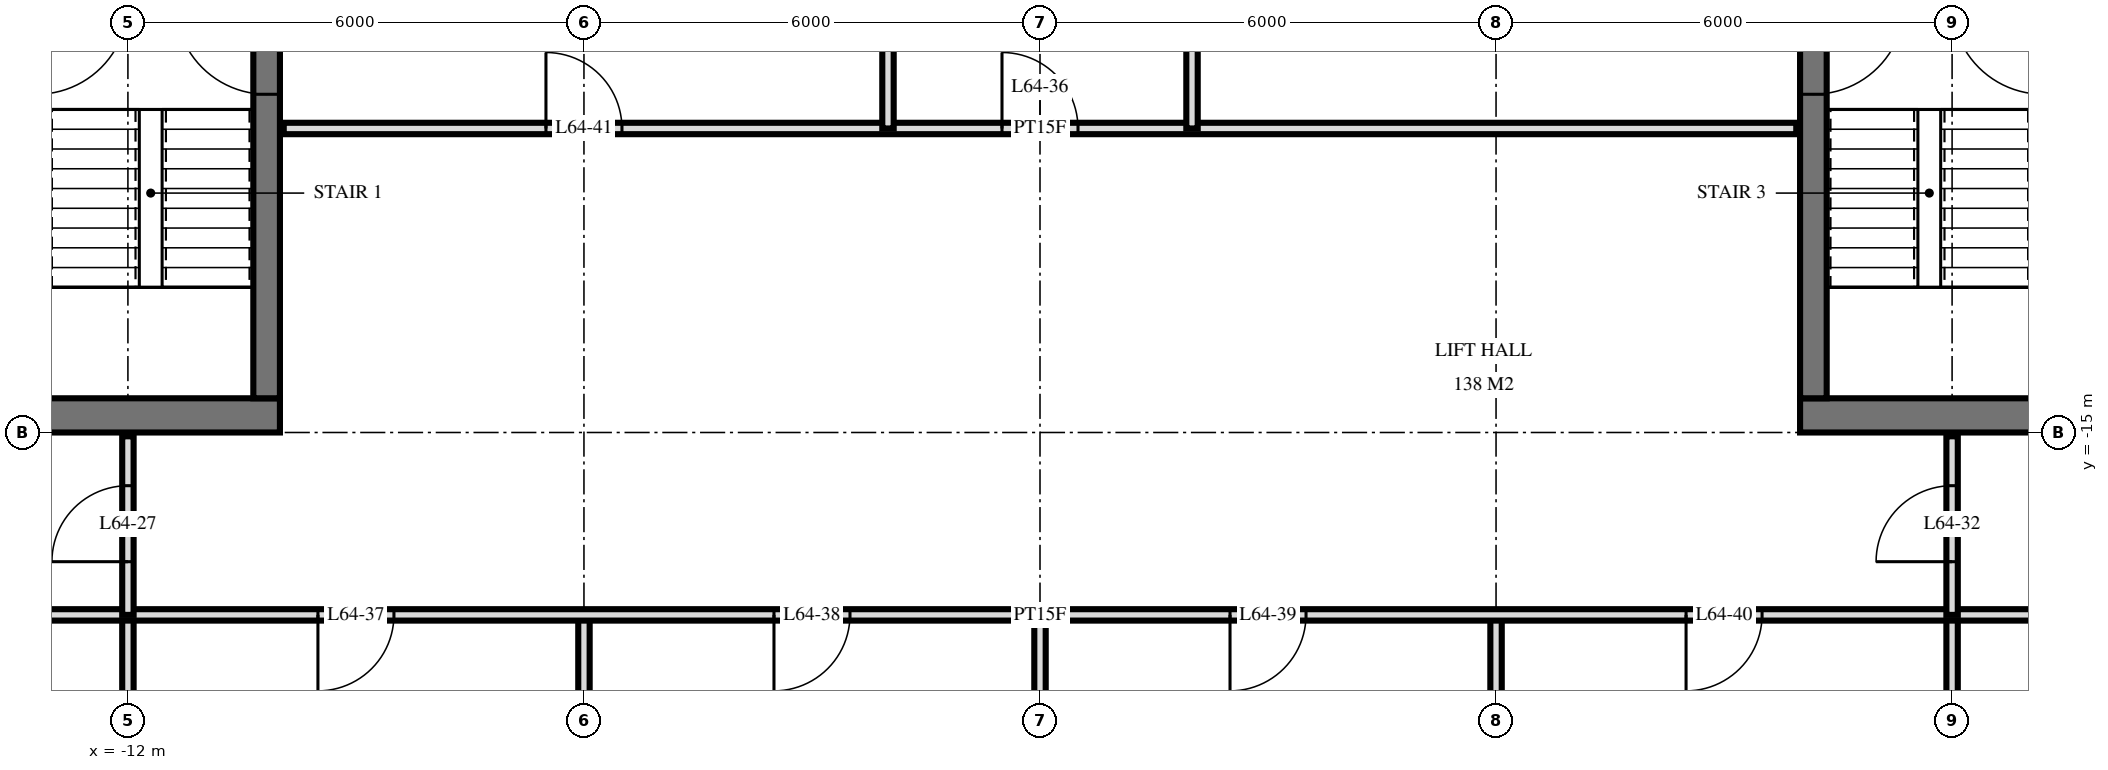
"""IFC4 building model, lengths in metres.
Left out: names, types, materials, properties, quantities, classifications, styles, units other than length and angle.
Written with IfcOpenShell. Run it as: python <this file> out.ifc"""

import sys

from ifc_helpers import new_model, si_unit, direction, frame, frame_2d, origin, place, context, subcontext, project, spatial, rectangle, extrude, element, fill, save


model = new_model("IFC4")
c1 = context("Model", 3, precision=1e-05, world=origin(), true_north=direction((0.0, 1.0)))
c2 = subcontext(c1, "Body", "Model", "MODEL_VIEW")
j1 = project(units=[si_unit("LENGTHUNIT", "METRE"), si_unit("PLANEANGLEUNIT", "RADIAN")], contexts=[c1])
p1 = place(None, origin())
s1 = spatial("IfcSite", under=j1, at=p1, CompositionType="ELEMENT")
p2 = place(p1, origin())
s2 = spatial("IfcBuilding", under=s1, at=p2, CompositionType="ELEMENT")
p3 = place(p2, frame((0.0, 0.0, 243.1)))
s3 = spatial("IfcBuildingStorey", under=s2, at=p3, CompositionType="ELEMENT", Elevation=243.1)
p4 = place(p3, frame((-24.5, -14.775, 0.0), z_axis=(0.0, 0.0, 1.0), x_axis=(1.0, 0.0, 0.0)))
e1 = element("IfcWall", 1, at=p4, inside=s3, PredefinedType="SHEAR", context=c2, shape_type="SweptSolid", body=[
    extrude(rectangle(XDim=14.5, YDim=0.45, at=frame_2d((7.25, 0.0))), origin(), (0.0, 0.0, 1.0), 3.5),
])
p5 = place(p4, frame((6.2, 0.0, 0.0)))
e2 = element("IfcOpeningElement", 2, at=p5, cuts=e1, PredefinedType="OPENING", context=c2, shape_type="SweptSolid", body=[
    extrude(rectangle(XDim=1.2, YDim=2.1, at=frame_2d((0.6, 1.05))), frame((0.0, 0.235, 0.0), z_axis=(0.0, -1.0, 0.0), x_axis=(1.0, 0.0, 0.0)), (0.0, 0.0, 1.0), 0.47),
])
p6 = place(p4, frame((9.25, 0.0, 0.0)))
e3 = element("IfcOpeningElement", 3, at=p6, cuts=e1, PredefinedType="OPENING", context=c2, shape_type="SweptSolid", body=[
    extrude(rectangle(XDim=1.1, YDim=2.1, at=frame_2d((0.55, 1.05))), frame((0.0, 0.235, 0.0), z_axis=(0.0, -1.0, 0.0), x_axis=(1.0, 0.0, 0.0)), (0.0, 0.0, 1.0), 0.47),
])
p7 = place(p4, frame((3.5, 0.0, 0.0)))
e4 = element("IfcOpeningElement", 4, at=p7, cuts=e1, PredefinedType="OPENING", context=c2, shape_type="SweptSolid", body=[
    extrude(rectangle(XDim=0.9, YDim=2.1, at=frame_2d((0.45, 1.05))), frame((0.0, 0.235, 0.0), z_axis=(0.0, -1.0, 0.0), x_axis=(1.0, 0.0, 0.0)), (0.0, 0.0, 1.0), 0.47),
])
p8 = place(p4, frame((1.05, 0.0, 0.0)))
e5 = element("IfcOpeningElement", 5, at=p8, cuts=e1, PredefinedType="OPENING", context=c2, shape_type="SweptSolid", body=[
    extrude(rectangle(XDim=1.0, YDim=2.1, at=frame_2d((0.5, 1.05))), frame((0.0, 0.235, 0.0), z_axis=(0.0, -1.0, 0.0), x_axis=(1.0, 0.0, 0.0)), (0.0, 0.0, 1.0), 0.47),
])
p9 = place(p3, frame((-10.175, -14.55, 0.0), z_axis=(0.0, 0.0, 1.0), x_axis=(0.0, 1.0, 0.0)))
e6 = element("IfcWall", 6, at=p9, inside=s3, PredefinedType="SHEAR", context=c2, shape_type="SweptSolid", body=[
    extrude(rectangle(XDim=14.1, YDim=0.35, at=frame_2d((7.05, 0.0))), origin(), (0.0, 0.0, 1.0), 3.5),
])
p10 = place(p9, frame((8.4, 0.0, 0.0)))
e7 = element("IfcOpeningElement", 7, at=p10, cuts=e6, PredefinedType="OPENING", context=c2, shape_type="SweptSolid", body=[
    extrude(rectangle(XDim=1.4, YDim=2.4, at=frame_2d((0.7, 1.2))), frame((0.0, 0.185, 0.0), z_axis=(0.0, -1.0, 0.0), x_axis=(1.0, 0.0, 0.0)), (0.0, 0.0, 1.0), 0.37),
])
p11 = place(p9, frame((10.0, 0.0, 0.0)))
e8 = element("IfcOpeningElement", 8, at=p11, cuts=e6, PredefinedType="OPENING", context=c2, shape_type="SweptSolid", body=[
    extrude(rectangle(XDim=1.4, YDim=2.4, at=frame_2d((0.7, 1.2))), frame((0.0, 0.185, 0.0), z_axis=(0.0, -1.0, 0.0), x_axis=(1.0, 0.0, 0.0)), (0.0, 0.0, 1.0), 0.37),
])
p12 = place(p9, frame((4.0, 0.0, 0.0)))
e9 = element("IfcOpeningElement", 9, at=p12, cuts=e6, PredefinedType="OPENING", context=c2, shape_type="SweptSolid", body=[
    extrude(rectangle(XDim=1.2, YDim=2.1, at=frame_2d((0.6, 1.05))), frame((0.0, 0.185, 0.0), z_axis=(0.0, -1.0, 0.0), x_axis=(1.0, 0.0, 0.0)), (0.0, 0.0, 1.0), 0.37),
])
p13 = place(p3, frame((10.0, -14.775, 0.0), z_axis=(0.0, 0.0, 1.0), x_axis=(1.0, 0.0, 0.0)))
e10 = element("IfcWall", 10, at=p13, inside=s3, PredefinedType="SHEAR", context=c2, shape_type="SweptSolid", body=[
    extrude(rectangle(XDim=14.5, YDim=0.45, at=frame_2d((7.25, 0.0))), origin(), (0.0, 0.0, 1.0), 3.5),
])
p14 = place(p13, frame((7.1, 0.0, 0.0)))
e11 = element("IfcOpeningElement", 11, at=p14, cuts=e10, PredefinedType="OPENING", context=c2, shape_type="SweptSolid", body=[
    extrude(rectangle(XDim=1.2, YDim=2.1, at=frame_2d((0.6, 1.05))), frame((0.0, 0.235, 0.0), z_axis=(0.0, -1.0, 0.0), x_axis=(1.0, 0.0, 0.0)), (0.0, 0.0, 1.0), 0.47),
])
p15 = place(p13, frame((4.15, 0.0, 0.0)))
e12 = element("IfcOpeningElement", 12, at=p15, cuts=e10, PredefinedType="OPENING", context=c2, shape_type="SweptSolid", body=[
    extrude(rectangle(XDim=1.1, YDim=2.1, at=frame_2d((0.55, 1.05))), frame((0.0, 0.235, 0.0), z_axis=(0.0, -1.0, 0.0), x_axis=(1.0, 0.0, 0.0)), (0.0, 0.0, 1.0), 0.47),
])
p16 = place(p13, frame((10.1, 0.0, 0.0)))
e13 = element("IfcOpeningElement", 13, at=p16, cuts=e10, PredefinedType="OPENING", context=c2, shape_type="SweptSolid", body=[
    extrude(rectangle(XDim=0.9, YDim=2.1, at=frame_2d((0.45, 1.05))), frame((0.0, 0.235, 0.0), z_axis=(0.0, -1.0, 0.0), x_axis=(1.0, 0.0, 0.0)), (0.0, 0.0, 1.0), 0.47),
])
p17 = place(p13, frame((12.45, 0.0, 0.0)))
e14 = element("IfcOpeningElement", 14, at=p17, cuts=e10, PredefinedType="OPENING", context=c2, shape_type="SweptSolid", body=[
    extrude(rectangle(XDim=1.0, YDim=2.1, at=frame_2d((0.5, 1.05))), frame((0.0, 0.235, 0.0), z_axis=(0.0, -1.0, 0.0), x_axis=(1.0, 0.0, 0.0)), (0.0, 0.0, 1.0), 0.47),
])
p18 = place(p3, frame((10.175, -14.55, 0.0), z_axis=(0.0, 0.0, 1.0), x_axis=(0.0, 1.0, 0.0)))
e15 = element("IfcWall", 15, at=p18, inside=s3, PredefinedType="SHEAR", context=c2, shape_type="SweptSolid", body=[
    extrude(rectangle(XDim=14.1, YDim=0.35, at=frame_2d((7.05, 0.0))), origin(), (0.0, 0.0, 1.0), 3.5),
])
p19 = place(p18, frame((8.4, 0.0, 0.0)))
e16 = element("IfcOpeningElement", 16, at=p19, cuts=e15, PredefinedType="OPENING", context=c2, shape_type="SweptSolid", body=[
    extrude(rectangle(XDim=1.4, YDim=2.4, at=frame_2d((0.7, 1.2))), frame((0.0, 0.185, 0.0), z_axis=(0.0, -1.0, 0.0), x_axis=(1.0, 0.0, 0.0)), (0.0, 0.0, 1.0), 0.37),
])
p20 = place(p18, frame((10.0, 0.0, 0.0)))
e17 = element("IfcOpeningElement", 17, at=p20, cuts=e15, PredefinedType="OPENING", context=c2, shape_type="SweptSolid", body=[
    extrude(rectangle(XDim=1.4, YDim=2.4, at=frame_2d((0.7, 1.2))), frame((0.0, 0.185, 0.0), z_axis=(0.0, -1.0, 0.0), x_axis=(1.0, 0.0, 0.0)), (0.0, 0.0, 1.0), 0.37),
])
p21 = place(p18, frame((4.0, 0.0, 0.0)))
e18 = element("IfcOpeningElement", 18, at=p21, cuts=e15, PredefinedType="OPENING", context=c2, shape_type="SweptSolid", body=[
    extrude(rectangle(XDim=1.2, YDim=2.1, at=frame_2d((0.6, 1.05))), frame((0.0, 0.185, 0.0), z_axis=(0.0, -1.0, 0.0), x_axis=(1.0, 0.0, 0.0)), (0.0, 0.0, 1.0), 0.37),
])
p22 = place(p3, frame((12.0, -17.4, 0.0), z_axis=(0.0, 0.0, 1.0), x_axis=(0.0, 1.0, 0.0)))
e19 = element("IfcWall", 19, at=p22, inside=s3, PredefinedType="PARTITIONING", context=c2, shape_type="SweptSolid", body=[
    extrude(rectangle(XDim=2.35, YDim=0.15, at=frame_2d((1.175, 0.0))), origin(), (0.0, 0.0, 1.0), 3.22),
])
p23 = place(p22, frame((0.7, 0.0, 0.0)))
e20 = element("IfcOpeningElement", 20, at=p23, cuts=e19, PredefinedType="OPENING", context=c2, shape_type="SweptSolid", body=[
    extrude(rectangle(XDim=1.0, YDim=2.1, at=frame_2d((0.5, 1.05))), frame((0.0, 0.085, 0.0), z_axis=(0.0, -1.0, 0.0), x_axis=(1.0, 0.0, 0.0)), (0.0, 0.0, 1.0), 0.17),
])
for number, where, z_axis, x_axis in (
    (21, (12.0, -29.22, 0.0), (0.0, 0.0, 1.0), (0.0, 1.0, 0.0)),
    (22, (6.0, -29.22, 0.0), (0.0, 0.0, 1.0), (0.0, 1.0, 0.0)),
):
    element("IfcWall", number, at=place(p3, frame(where, z_axis=z_axis, x_axis=x_axis)), inside=s3, PredefinedType="PARTITIONING", context=c2, shape_type="SweptSolid", body=[
        extrude(rectangle(XDim=11.82, YDim=0.15, at=frame_2d((5.91, 0.0))), origin(), (0.0, 0.0, 1.0), 3.22),
    ])
p24 = place(p3, frame((2.0, -11.0, 0.0), z_axis=(0.0, 0.0, 1.0), x_axis=(0.0, 1.0, 0.0)))
e23 = element("IfcWall", 23, at=p24, inside=s3, PredefinedType="PARTITIONING", context=c2, shape_type="SweptSolid", body=[
    extrude(rectangle(XDim=4.0, YDim=0.15, at=frame_2d((2.0, 0.0))), origin(), (0.0, 0.0, 1.0), 3.22),
])
p25 = place(p3, frame((0.0, -29.22, 0.0), z_axis=(0.0, 0.0, 1.0), x_axis=(0.0, 1.0, 0.0)))
e24 = element("IfcWall", 24, at=p25, inside=s3, PredefinedType="PARTITIONING", context=c2, shape_type="SweptSolid", body=[
    extrude(rectangle(XDim=11.82, YDim=0.15, at=frame_2d((5.91, 0.0))), origin(), (0.0, 0.0, 1.0), 3.22),
])
p26 = place(p3, frame((-2.0, -11.0, 0.0), z_axis=(0.0, 0.0, 1.0), x_axis=(0.0, 1.0, 0.0)))
e25 = element("IfcWall", 25, at=p26, inside=s3, PredefinedType="PARTITIONING", context=c2, shape_type="SweptSolid", body=[
    extrude(rectangle(XDim=4.0, YDim=0.15, at=frame_2d((2.0, 0.0))), origin(), (0.0, 0.0, 1.0), 3.22),
])
p27 = place(p3, frame((-6.0, -29.22, 0.0), z_axis=(0.0, 0.0, 1.0), x_axis=(0.0, 1.0, 0.0)))
e26 = element("IfcWall", 26, at=p27, inside=s3, PredefinedType="PARTITIONING", context=c2, shape_type="SweptSolid", body=[
    extrude(rectangle(XDim=11.82, YDim=0.15, at=frame_2d((5.91, 0.0))), origin(), (0.0, 0.0, 1.0), 3.22),
])
p28 = place(p3, frame((-12.0, -17.4, 0.0), z_axis=(0.0, 0.0, 1.0), x_axis=(0.0, 1.0, 0.0)))
e27 = element("IfcWall", 27, at=p28, inside=s3, PredefinedType="PARTITIONING", context=c2, shape_type="SweptSolid", body=[
    extrude(rectangle(XDim=2.35, YDim=0.15, at=frame_2d((1.175, 0.0))), origin(), (0.0, 0.0, 1.0), 3.22),
])
p29 = place(p28, frame((0.7, 0.0, 0.0)))
e28 = element("IfcOpeningElement", 28, at=p29, cuts=e27, PredefinedType="OPENING", context=c2, shape_type="SweptSolid", body=[
    extrude(rectangle(XDim=1.0, YDim=2.1, at=frame_2d((0.5, 1.05))), frame((0.0, 0.085, 0.0), z_axis=(0.0, -1.0, 0.0), x_axis=(1.0, 0.0, 0.0)), (0.0, 0.0, 1.0), 0.17),
])
p30 = place(p3, frame((-12.0, -29.22, 0.0), z_axis=(0.0, 0.0, 1.0), x_axis=(0.0, 1.0, 0.0)))
e29 = element("IfcWall", 29, at=p30, inside=s3, PredefinedType="PARTITIONING", context=c2, shape_type="SweptSolid", body=[
    extrude(rectangle(XDim=11.82, YDim=0.15, at=frame_2d((5.91, 0.0))), origin(), (0.0, 0.0, 1.0), 3.22),
])
p31 = place(p3, frame((-26.82, -17.4, 0.0), z_axis=(0.0, 0.0, 1.0), x_axis=(1.0, 0.0, 0.0)))
e30 = element("IfcWall", 30, at=p31, inside=s3, PredefinedType="PARTITIONING", context=c2, shape_type="SweptSolid", body=[
    extrude(rectangle(XDim=53.64, YDim=0.15, at=frame_2d((26.82, 0.0))), origin(), (0.0, 0.0, 1.0), 3.22),
])
p32 = place(p31, frame((11.97, 0.0, 0.0)))
e31 = element("IfcOpeningElement", 31, at=p32, cuts=e30, PredefinedType="OPENING", context=c2, shape_type="SweptSolid", body=[
    extrude(rectangle(XDim=1.0, YDim=2.1, at=frame_2d((0.5, 1.05))), frame((0.0, 0.085, 0.0), z_axis=(0.0, -1.0, 0.0), x_axis=(1.0, 0.0, 0.0)), (0.0, 0.0, 1.0), 0.17),
])
p33 = place(p31, frame((3.92, 0.0, 0.0)))
e32 = element("IfcOpeningElement", 32, at=p33, cuts=e30, PredefinedType="OPENING", context=c2, shape_type="SweptSolid", body=[
    extrude(rectangle(XDim=1.0, YDim=2.1, at=frame_2d((0.5, 1.05))), frame((0.0, 0.085, 0.0), z_axis=(0.0, -1.0, 0.0), x_axis=(1.0, 0.0, 0.0)), (0.0, 0.0, 1.0), 0.17),
])
p34 = place(p31, frame((5.72, 0.0, 0.0)))
e33 = element("IfcOpeningElement", 33, at=p34, cuts=e30, PredefinedType="OPENING", context=c2, shape_type="SweptSolid", body=[
    extrude(rectangle(XDim=1.0, YDim=2.1, at=frame_2d((0.5, 1.05))), frame((0.0, 0.085, 0.0), z_axis=(0.0, -1.0, 0.0), x_axis=(1.0, 0.0, 0.0)), (0.0, 0.0, 1.0), 0.17),
])
p35 = place(p31, frame((47.72, 0.0, 0.0)))
e34 = element("IfcOpeningElement", 34, at=p35, cuts=e30, PredefinedType="OPENING", context=c2, shape_type="SweptSolid", body=[
    extrude(rectangle(XDim=1.0, YDim=2.1, at=frame_2d((0.5, 1.05))), frame((0.0, 0.085, 0.0), z_axis=(0.0, -1.0, 0.0), x_axis=(1.0, 0.0, 0.0)), (0.0, 0.0, 1.0), 0.17),
])
p36 = place(p31, frame((51.02, 0.0, 0.0)))
e35 = element("IfcOpeningElement", 35, at=p36, cuts=e30, PredefinedType="OPENING", context=c2, shape_type="SweptSolid", body=[
    extrude(rectangle(XDim=1.0, YDim=2.1, at=frame_2d((0.5, 1.05))), frame((0.0, 0.085, 0.0), z_axis=(0.0, -1.0, 0.0), x_axis=(1.0, 0.0, 0.0)), (0.0, 0.0, 1.0), 0.17),
])
p37 = place(p31, frame((17.32, 0.0, 0.0)))
e36 = element("IfcOpeningElement", 36, at=p37, cuts=e30, PredefinedType="OPENING", context=c2, shape_type="SweptSolid", body=[
    extrude(rectangle(XDim=1.0, YDim=2.1, at=frame_2d((0.5, 1.05))), frame((0.0, 0.085, 0.0), z_axis=(0.0, -1.0, 0.0), x_axis=(1.0, 0.0, 0.0)), (0.0, 0.0, 1.0), 0.17),
])
p38 = place(p31, frame((23.32, 0.0, 0.0)))
e37 = element("IfcOpeningElement", 37, at=p38, cuts=e30, PredefinedType="OPENING", context=c2, shape_type="SweptSolid", body=[
    extrude(rectangle(XDim=1.0, YDim=2.1, at=frame_2d((0.5, 1.05))), frame((0.0, 0.085, 0.0), z_axis=(0.0, -1.0, 0.0), x_axis=(1.0, 0.0, 0.0)), (0.0, 0.0, 1.0), 0.17),
])
p39 = place(p31, frame((29.32, 0.0, 0.0)))
e38 = element("IfcOpeningElement", 38, at=p39, cuts=e30, PredefinedType="OPENING", context=c2, shape_type="SweptSolid", body=[
    extrude(rectangle(XDim=1.0, YDim=2.1, at=frame_2d((0.5, 1.05))), frame((0.0, 0.085, 0.0), z_axis=(0.0, -1.0, 0.0), x_axis=(1.0, 0.0, 0.0)), (0.0, 0.0, 1.0), 0.17),
])
p40 = place(p31, frame((35.32, 0.0, 0.0)))
e39 = element("IfcOpeningElement", 39, at=p40, cuts=e30, PredefinedType="OPENING", context=c2, shape_type="SweptSolid", body=[
    extrude(rectangle(XDim=1.0, YDim=2.1, at=frame_2d((0.5, 1.05))), frame((0.0, 0.085, 0.0), z_axis=(0.0, -1.0, 0.0), x_axis=(1.0, 0.0, 0.0)), (0.0, 0.0, 1.0), 0.17),
])
p41 = place(p3, frame((-9.95, -11.0, 0.0), z_axis=(0.0, 0.0, 1.0), x_axis=(1.0, 0.0, 0.0)))
e40 = element("IfcWall", 40, at=p41, inside=s3, PredefinedType="PARTITIONING", context=c2, shape_type="SweptSolid", body=[
    extrude(rectangle(XDim=19.9, YDim=0.15, at=frame_2d((9.95, 0.0))), origin(), (0.0, 0.0, 1.0), 3.22),
])
p42 = place(p41, frame((9.45, 0.0, 0.0)))
e41 = element("IfcOpeningElement", 41, at=p42, cuts=e40, PredefinedType="OPENING", context=c2, shape_type="SweptSolid", body=[
    extrude(rectangle(XDim=1.0, YDim=2.1, at=frame_2d((0.5, 1.05))), frame((0.0, 0.085, 0.0), z_axis=(0.0, -1.0, 0.0), x_axis=(1.0, 0.0, 0.0)), (0.0, 0.0, 1.0), 0.17),
])
p43 = place(p41, frame((3.45, 0.0, 0.0)))
e42 = element("IfcOpeningElement", 42, at=p43, cuts=e40, PredefinedType="OPENING", context=c2, shape_type="SweptSolid", body=[
    extrude(rectangle(XDim=1.0, YDim=2.1, at=frame_2d((0.5, 1.05))), frame((0.0, 0.085, 0.0), z_axis=(0.0, -1.0, 0.0), x_axis=(1.0, 0.0, 0.0)), (0.0, 0.0, 1.0), 0.17),
])
p44 = place(p12, origin())
e43 = element("IfcDoor", 43, at=p44, inside=s3, OperationType="SINGLE_SWING_LEFT", PredefinedType="DOOR", context=c2, shape_type="SweptSolid", body=[
    extrude(rectangle(XDim=1.2, YDim=2.1, at=frame_2d((0.6, 1.05))), frame((0.0, 0.025, 0.0), z_axis=(0.0, -1.0, 0.0), x_axis=(1.0, 0.0, 0.0)), (0.0, 0.0, 1.0), 0.05),
])
fill(e9, e43)
p45 = place(p21, frame((0.6, 0.0, 0.0), z_axis=(0.0, 0.0, 1.0), x_axis=(-1.0, 0.0, 0.0)))
e44 = element("IfcDoor", 44, at=p45, inside=s3, OperationType="SINGLE_SWING_RIGHT", PredefinedType="DOOR", context=c2, shape_type="SweptSolid", body=[
    extrude(rectangle(XDim=1.2, YDim=2.1, at=frame_2d((0.0, 1.05))), frame((0.0, -0.025, 0.0), z_axis=(0.0, 1.0, 0.0), x_axis=(-1.0, 0.0, 0.0)), (0.0, 0.0, 1.0), 0.05),
])
fill(e18, e44)
p46 = place(p29, origin())
e45 = element("IfcDoor", 45, at=p46, inside=s3, OperationType="SINGLE_SWING_RIGHT", PredefinedType="DOOR", context=c2, shape_type="SweptSolid", body=[
    extrude(rectangle(XDim=1.0, YDim=2.1, at=frame_2d((0.5, 1.05))), frame((0.0, 0.025, 0.0), z_axis=(0.0, -1.0, 0.0), x_axis=(1.0, 0.0, 0.0)), (0.0, 0.0, 1.0), 0.05),
])
fill(e28, e45)
p47 = place(p23, origin())
e46 = element("IfcDoor", 46, at=p47, inside=s3, OperationType="SINGLE_SWING_RIGHT", PredefinedType="DOOR", context=c2, shape_type="SweptSolid", body=[
    extrude(rectangle(XDim=1.0, YDim=2.1, at=frame_2d((0.5, 1.05))), frame((0.0, 0.025, 0.0), z_axis=(0.0, -1.0, 0.0), x_axis=(1.0, 0.0, 0.0)), (0.0, 0.0, 1.0), 0.05),
])
fill(e20, e46)
p48 = place(p42, origin())
e47 = element("IfcDoor", 47, at=p48, inside=s3, OperationType="SINGLE_SWING_RIGHT", PredefinedType="DOOR", context=c2, shape_type="SweptSolid", body=[
    extrude(rectangle(XDim=1.0, YDim=2.1, at=frame_2d((0.5, 1.05))), frame((0.0, 0.025, 0.0), z_axis=(0.0, -1.0, 0.0), x_axis=(1.0, 0.0, 0.0)), (0.0, 0.0, 1.0), 0.05),
])
fill(e41, e47)
p49 = place(p37, frame((0.5, 0.0, 0.0), z_axis=(0.0, 0.0, 1.0), x_axis=(-1.0, 0.0, 0.0)))
e48 = element("IfcDoor", 48, at=p49, inside=s3, OperationType="SINGLE_SWING_LEFT", PredefinedType="DOOR", context=c2, shape_type="SweptSolid", body=[
    extrude(rectangle(XDim=1.0, YDim=2.1, at=frame_2d((0.0, 1.05))), frame((0.0, -0.025, 0.0), z_axis=(0.0, 1.0, 0.0), x_axis=(-1.0, 0.0, 0.0)), (0.0, 0.0, 1.0), 0.05),
])
fill(e36, e48)
p50 = place(p38, frame((0.5, 0.0, 0.0), z_axis=(0.0, 0.0, 1.0), x_axis=(-1.0, 0.0, 0.0)))
e49 = element("IfcDoor", 49, at=p50, inside=s3, OperationType="SINGLE_SWING_LEFT", PredefinedType="DOOR", context=c2, shape_type="SweptSolid", body=[
    extrude(rectangle(XDim=1.0, YDim=2.1, at=frame_2d((0.0, 1.05))), frame((0.0, -0.025, 0.0), z_axis=(0.0, 1.0, 0.0), x_axis=(-1.0, 0.0, 0.0)), (0.0, 0.0, 1.0), 0.05),
])
fill(e37, e49)
p51 = place(p39, frame((0.5, 0.0, 0.0), z_axis=(0.0, 0.0, 1.0), x_axis=(-1.0, 0.0, 0.0)))
e50 = element("IfcDoor", 50, at=p51, inside=s3, OperationType="SINGLE_SWING_LEFT", PredefinedType="DOOR", context=c2, shape_type="SweptSolid", body=[
    extrude(rectangle(XDim=1.0, YDim=2.1, at=frame_2d((0.0, 1.05))), frame((0.0, -0.025, 0.0), z_axis=(0.0, 1.0, 0.0), x_axis=(-1.0, 0.0, 0.0)), (0.0, 0.0, 1.0), 0.05),
])
fill(e38, e50)
p52 = place(p40, frame((0.5, 0.0, 0.0), z_axis=(0.0, 0.0, 1.0), x_axis=(-1.0, 0.0, 0.0)))
e51 = element("IfcDoor", 51, at=p52, inside=s3, OperationType="SINGLE_SWING_LEFT", PredefinedType="DOOR", context=c2, shape_type="SweptSolid", body=[
    extrude(rectangle(XDim=1.0, YDim=2.1, at=frame_2d((0.0, 1.05))), frame((0.0, -0.025, 0.0), z_axis=(0.0, 1.0, 0.0), x_axis=(-1.0, 0.0, 0.0)), (0.0, 0.0, 1.0), 0.05),
])
fill(e39, e51)
p53 = place(p43, origin())
e52 = element("IfcDoor", 52, at=p53, inside=s3, OperationType="SINGLE_SWING_RIGHT", PredefinedType="DOOR", context=c2, shape_type="SweptSolid", body=[
    extrude(rectangle(XDim=1.0, YDim=2.1, at=frame_2d((0.5, 1.05))), frame((0.0, 0.025, 0.0), z_axis=(0.0, -1.0, 0.0), x_axis=(1.0, 0.0, 0.0)), (0.0, 0.0, 1.0), 0.05),
])
fill(e42, e52)
save(model, sys.argv[1])
